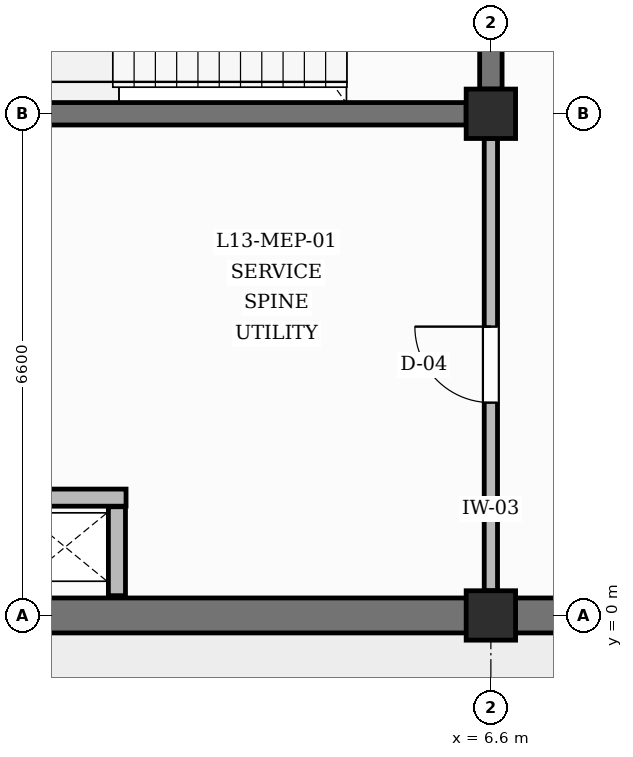
"""IFC4 building model, lengths in metres.
Left out: names, types, materials, properties, quantities, classifications, styles, units other than length and angle.
Written with IfcOpenShell. Run it as: python <this file> out.ifc"""

import sys

from ifc_helpers import new_model, si_unit, direction, frame, frame_2d, origin, origin_2d, place, context, subcontext, project, spatial, rectangle, extrude, element, fill, save


model = new_model("IFC4")
c1 = context("Model", 3, precision=1e-05, world=origin(), true_north=direction((0.0, 1.0)))
c2 = subcontext(c1, "Body", "Model", "MODEL_VIEW")
j1 = project(units=[si_unit("LENGTHUNIT", "METRE"), si_unit("PLANEANGLEUNIT", "RADIAN")], contexts=[c1])
p1 = place(None, origin())
s1 = spatial("IfcSite", under=j1, at=p1, CompositionType="ELEMENT")
p2 = place(p1, origin())
s2 = spatial("IfcBuilding", under=s1, at=p2, CompositionType="ELEMENT")
p3 = place(p2, frame((0.0, 0.0, 56.4)))
s3 = spatial("IfcBuildingStorey", under=s2, at=p3, CompositionType="ELEMENT", Elevation=56.4)
for number, where, z_axis, x_axis in (
    (1, (6.6, 0.0, 0.0), (0.0, 0.0, 1.0), (1.0, 0.0, 0.0)),
    (2, (6.6, 6.6, 0.0), (0.0, 0.0, 1.0), (1.0, 0.0, 0.0)),
):
    element("IfcColumn", number, at=place(p3, frame(where, z_axis=z_axis, x_axis=x_axis)), inside=s3, PredefinedType="COLUMN", context=c2, shape_type="SweptSolid", body=[
        extrude(rectangle(XDim=0.65, YDim=0.65, at=origin_2d()), origin(), (0.0, 0.0, 1.0), 4.2),
    ])
for number, where, z_axis, x_axis in (
    (3, (0.325, 0.0, 0.0), (0.0, 0.0, 1.0), (1.0, 0.0, 0.0)),
    (4, (6.925, 0.0, 0.0), (0.0, 0.0, 1.0), (1.0, 0.0, 0.0)),
):
    element("IfcWall", number, at=place(p3, frame(where, z_axis=z_axis, x_axis=x_axis)), inside=s3, PredefinedType="SOLIDWALL", context=c2, shape_type="SweptSolid", body=[
        extrude(rectangle(XDim=5.95, YDim=0.46, at=frame_2d((2.975, 0.0))), origin(), (0.0, 0.0, 1.0), 3.3),
    ])
p4 = place(p3, frame((0.325, 6.6, 0.0), z_axis=(0.0, 0.0, 1.0), x_axis=(1.0, 0.0, 0.0)))
e5 = element("IfcWall", 5, at=p4, inside=s3, PredefinedType="SHEAR", context=c2, shape_type="SweptSolid", body=[
    extrude(rectangle(XDim=5.95, YDim=0.295, at=frame_2d((2.975, 0.0))), origin(), (0.0, 0.0, 1.0), 3.3),
])
p5 = place(p3, frame((6.6, 6.925, 0.0), z_axis=(0.0, 0.0, 1.0), x_axis=(0.0, 1.0, 0.0)))
e6 = element("IfcWall", 6, at=p5, inside=s3, PredefinedType="SHEAR", context=c2, shape_type="SweptSolid", body=[
    extrude(rectangle(XDim=5.95, YDim=0.295, at=frame_2d((2.975, 0.0))), origin(), (0.0, 0.0, 1.0), 3.3),
])
p6 = place(p5, frame((2.425, 0.0, 0.0)))
e7 = element("IfcOpeningElement", 7, at=p6, cuts=e6, PredefinedType="OPENING", context=c2, shape_type="SweptSolid", body=[
    extrude(rectangle(XDim=1.1, YDim=2.15, at=frame_2d((0.55, 1.075))), frame((0.0, 0.157, 0.0), z_axis=(0.0, -1.0, 0.0), x_axis=(1.0, 0.0, 0.0)), (0.0, 0.0, 1.0), 0.315),
])
p7 = place(p3, frame((1.68, 0.26, 0.0), z_axis=(0.0, 0.0, 1.0), x_axis=(0.0, 1.0, 0.0)))
e8 = element("IfcWall", 8, at=p7, inside=s3, PredefinedType="PARTITIONING", context=c2, shape_type="SweptSolid", body=[
    extrude(rectangle(XDim=1.17, YDim=0.225, at=frame_2d((0.585, 0.0))), origin(), (0.0, 0.0, 1.0), 3.9),
])
p8 = place(p3, frame((0.26, 1.55, 0.0), z_axis=(0.0, 0.0, 1.0), x_axis=(1.0, 0.0, 0.0)))
e9 = element("IfcWall", 9, at=p8, inside=s3, PredefinedType="PARTITIONING", context=c2, shape_type="SweptSolid", body=[
    extrude(rectangle(XDim=1.54, YDim=0.225, at=frame_2d((0.77, 0.0))), origin(), (0.0, 0.0, 1.0), 3.9),
])
p9 = place(p3, frame((6.6, 0.325, 0.0), z_axis=(0.0, 0.0, 1.0), x_axis=(0.0, 1.0, 0.0)))
e10 = element("IfcWall", 10, at=p9, inside=s3, PredefinedType="PARTITIONING", context=c2, shape_type="SweptSolid", body=[
    extrude(rectangle(XDim=5.95, YDim=0.175, at=frame_2d((2.975, 0.0))), origin(), (0.0, 0.0, 1.0), 3.3),
])
p10 = place(p9, frame((2.475, 0.0, 0.0)))
e11 = element("IfcOpeningElement", 11, at=p10, cuts=e10, PredefinedType="OPENING", context=c2, shape_type="SweptSolid", body=[
    extrude(rectangle(XDim=1.0, YDim=2.1, at=frame_2d((0.5, 1.05))), frame((0.0, 0.097, 0.0), z_axis=(0.0, -1.0, 0.0), x_axis=(1.0, 0.0, 0.0)), (0.0, 0.0, 1.0), 0.195),
])
p11 = place(p10, origin())
e12 = element("IfcDoor", 12, at=p11, inside=s3, OperationType="SINGLE_SWING_RIGHT", PredefinedType="DOOR", context=c2, shape_type="SweptSolid", body=[
    extrude(rectangle(XDim=1.0, YDim=2.1, at=frame_2d((0.5, 1.05))), frame((0.0, 0.025, 0.0), z_axis=(0.0, -1.0, 0.0), x_axis=(1.0, 0.0, 0.0)), (0.0, 0.0, 1.0), 0.05),
])
fill(e11, e12)
save(model, sys.argv[1])
